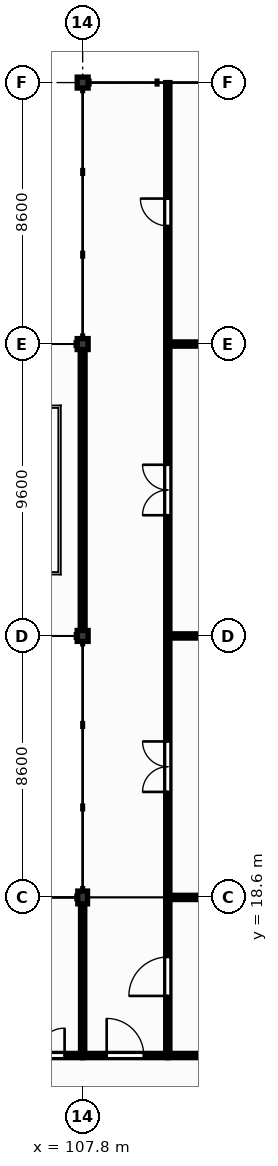
"""IFC4 building model, lengths in metres.
Left out: names, types, materials, properties, quantities, classifications, styles, units other than length and angle.
Written with IfcOpenShell. Run it as: python <this file> out.ifc"""

import sys

from ifc_helpers import new_model, si_unit, direction, frame, frame_2d, origin, origin_2d, place, context, subcontext, project, spatial, rectangle, extrude, element, fill, save


model = new_model("IFC4")
c1 = context("Model", 3, precision=1e-05, world=origin(), true_north=direction((0.0, 1.0)))
c2 = subcontext(c1, "Body", "Model", "MODEL_VIEW")
j1 = project(units=[si_unit("LENGTHUNIT", "METRE"), si_unit("PLANEANGLEUNIT", "RADIAN")], contexts=[c1])
p1 = place(None, origin())
s1 = spatial("IfcSite", under=j1, at=p1, CompositionType="ELEMENT")
p2 = place(p1, origin())
s2 = spatial("IfcBuilding", under=s1, at=p2, CompositionType="ELEMENT")
p3 = place(p2, frame((0.0, 0.0, 4.5)))
s3 = spatial("IfcBuildingStorey", under=s2, at=p3, CompositionType="ELEMENT", Elevation=4.5)
p4 = place(p3, frame((107.8, 18.6, 0.0), z_axis=(0.0, 0.0, 1.0), x_axis=(1.0, 0.0, 0.0)))
e1 = element("IfcColumn", 1, at=p4, inside=s3, PredefinedType="COLUMN", context=c2, shape_type="SweptSolid", body=[
    extrude(rectangle(XDim=0.32, YDim=0.42, at=origin_2d()), origin(), (0.0, 0.0, 1.0), 4.26),
])
for number, where, z_axis, x_axis in (
    (2, (107.8, 27.2, 0.0), (0.0, 0.0, 1.0), (1.0, 0.0, 0.0)),
    (3, (107.8, 36.8, 0.0), (0.0, 0.0, 1.0), (1.0, 0.0, 0.0)),
    (4, (107.8, 45.4, 0.0), (0.0, 0.0, 1.0), (1.0, 0.0, 0.0)),
):
    element("IfcColumn", number, at=place(p3, frame(where, z_axis=z_axis, x_axis=x_axis)), inside=s3, PredefinedType="COLUMN", context=c2, shape_type="SweptSolid", body=[
        extrude(rectangle(XDim=0.36, YDim=0.36, at=origin_2d()), origin(), (0.0, 0.0, 1.0), 4.3),
    ])
p5 = place(p3, frame((104.812, 13.4, 0.0), z_axis=(0.0, 0.0, 1.0), x_axis=(1.0, 0.0, 0.0)))
e5 = element("IfcWall", 5, at=p5, inside=s3, PredefinedType="PARTITIONING", context=c2, shape_type="SweptSolid", body=[
    extrude(rectangle(XDim=2.988, YDim=0.14, at=frame_2d((1.494, 0.0))), origin(), (0.0, 0.0, 1.0), 4.18),
])
p6 = place(p5, frame((0.594, 0.0, 0.0)))
e6 = element("IfcOpeningElement", 6, at=p6, cuts=e5, PredefinedType="OPENING", context=c2, shape_type="SweptSolid", body=[
    extrude(rectangle(XDim=1.8, YDim=2.3, at=frame_2d((0.9, 1.15))), frame((0.0, 0.08, 0.0), z_axis=(0.0, -1.0, 0.0), x_axis=(1.0, 0.0, 0.0)), (0.0, 0.0, 1.0), 0.16),
])
p7 = place(p3, frame((107.8, 13.47, 0.0), z_axis=(0.0, 0.0, 1.0), x_axis=(0.0, 1.0, 0.0)))
e7 = element("IfcWall", 7, at=p7, inside=s3, PredefinedType="PARTITIONING", context=c2, shape_type="SweptSolid", body=[
    extrude(rectangle(XDim=4.92, YDim=0.14, at=frame_2d((2.46, 0.0))), origin(), (0.0, 0.0, 1.0), 3.74),
])
p8 = place(p3, frame((107.8, 13.4, 0.0), z_axis=(0.0, 0.0, 1.0), x_axis=(1.0, 0.0, 0.0)))
e8 = element("IfcWall", 8, at=p8, inside=s3, PredefinedType="PARTITIONING", context=c2, shape_type="SweptSolid", body=[
    extrude(rectangle(XDim=2.8, YDim=0.14, at=frame_2d((1.4, 0.0))), origin(), (0.0, 0.0, 1.0), 4.18),
])
p9 = place(p8, frame((0.79, 0.0, 0.0)))
e9 = element("IfcOpeningElement", 9, at=p9, cuts=e8, PredefinedType="OPENING", context=c2, shape_type="SweptSolid", body=[
    extrude(rectangle(XDim=1.22, YDim=2.1, at=frame_2d((0.61, 1.05))), frame((0.0, 0.08, 0.0), z_axis=(0.0, -1.0, 0.0), x_axis=(1.0, 0.0, 0.0)), (0.0, 0.0, 1.0), 0.16),
])
p10 = place(p3, frame((110.6, 13.47, 0.0), z_axis=(0.0, 0.0, 1.0), x_axis=(0.0, 1.0, 0.0)))
e10 = element("IfcWall", 10, at=p10, inside=s3, PredefinedType="PARTITIONING", context=c2, shape_type="SweptSolid", body=[
    extrude(rectangle(XDim=5.06, YDim=0.14, at=frame_2d((2.53, 0.0))), origin(), (0.0, 0.0, 1.0), 4.18),
])
p11 = place(p10, frame((1.89, 0.0, 0.0)))
e11 = element("IfcOpeningElement", 11, at=p11, cuts=e10, PredefinedType="OPENING", context=c2, shape_type="SweptSolid", body=[
    extrude(rectangle(XDim=1.28, YDim=2.2, at=frame_2d((0.64, 1.1))), frame((0.0, 0.08, 0.0), z_axis=(0.0, -1.0, 0.0), x_axis=(1.0, 0.0, 0.0)), (0.0, 0.0, 1.0), 0.16),
])
p12 = place(p3, frame((110.6, 13.4, 0.0), z_axis=(0.0, 0.0, 1.0), x_axis=(1.0, 0.0, 0.0)))
e12 = element("IfcWall", 12, at=p12, inside=s3, PredefinedType="PARTITIONING", context=c2, shape_type="SweptSolid", body=[
    extrude(rectangle(XDim=4.4, YDim=0.14, at=frame_2d((2.2, 0.0))), origin(), (0.0, 0.0, 1.0), 4.18),
])
p13 = place(p3, frame((110.6, 18.67, 0.0), z_axis=(0.0, 0.0, 1.0), x_axis=(0.0, 1.0, 0.0)))
e13 = element("IfcWall", 13, at=p13, inside=s3, PredefinedType="PARTITIONING", context=c2, shape_type="SweptSolid", body=[
    extrude(rectangle(XDim=8.46, YDim=0.14, at=frame_2d((4.23, 0.0))), origin(), (0.0, 0.0, 1.0), 4.18),
])
p14 = place(p13, frame((3.4, 0.0, 0.0)))
e14 = element("IfcOpeningElement", 14, at=p14, cuts=e13, PredefinedType="OPENING", context=c2, shape_type="SweptSolid", body=[
    extrude(rectangle(XDim=1.66, YDim=2.3, at=frame_2d((0.83, 1.15))), frame((0.0, 0.08, 0.0), z_axis=(0.0, -1.0, 0.0), x_axis=(1.0, 0.0, 0.0)), (0.0, 0.0, 1.0), 0.16),
])
p15 = place(p3, frame((110.6, 18.6, 0.0), z_axis=(0.0, 0.0, 1.0), x_axis=(1.0, 0.0, 0.0)))
e15 = element("IfcWall", 15, at=p15, inside=s3, PredefinedType="PARTITIONING", context=c2, shape_type="SweptSolid", body=[
    extrude(rectangle(XDim=4.15, YDim=0.14, at=frame_2d((2.075, 0.0))), origin(), (0.0, 0.0, 1.0), 3.76),
])
p16 = place(p3, frame((110.6, 27.27, 0.0), z_axis=(0.0, 0.0, 1.0), x_axis=(0.0, 1.0, 0.0)))
e16 = element("IfcWall", 16, at=p16, inside=s3, PredefinedType="PARTITIONING", context=c2, shape_type="SweptSolid", body=[
    extrude(rectangle(XDim=9.46, YDim=0.14, at=frame_2d((4.73, 0.0))), origin(), (0.0, 0.0, 1.0), 4.18),
])
p17 = place(p16, frame((3.9, 0.0, 0.0)))
e17 = element("IfcOpeningElement", 17, at=p17, cuts=e16, PredefinedType="OPENING", context=c2, shape_type="SweptSolid", body=[
    extrude(rectangle(XDim=1.66, YDim=2.3, at=frame_2d((0.83, 1.15))), frame((0.0, 0.08, 0.0), z_axis=(0.0, -1.0, 0.0), x_axis=(1.0, 0.0, 0.0)), (0.0, 0.0, 1.0), 0.16),
])
p18 = place(p3, frame((110.6, 27.2, 0.0), z_axis=(0.0, 0.0, 1.0), x_axis=(1.0, 0.0, 0.0)))
e18 = element("IfcWall", 18, at=p18, inside=s3, PredefinedType="PARTITIONING", context=c2, shape_type="SweptSolid", body=[
    extrude(rectangle(XDim=4.15, YDim=0.14, at=frame_2d((2.075, 0.0))), origin(), (0.0, 0.0, 1.0), 3.87),
])
p19 = place(p3, frame((110.6, 36.87, 0.0), z_axis=(0.0, 0.0, 1.0), x_axis=(0.0, 1.0, 0.0)))
e19 = element("IfcWall", 19, at=p19, inside=s3, PredefinedType="PARTITIONING", context=c2, shape_type="SweptSolid", body=[
    extrude(rectangle(XDim=8.53, YDim=0.14, at=frame_2d((4.265, 0.0))), origin(), (0.0, 0.0, 1.0), 4.18),
])
p20 = place(p19, frame((3.815, 0.0, 0.0)))
e20 = element("IfcOpeningElement", 20, at=p20, cuts=e19, PredefinedType="OPENING", context=c2, shape_type="SweptSolid", body=[
    extrude(rectangle(XDim=0.9, YDim=2.1, at=frame_2d((0.45, 1.05))), frame((0.0, 0.08, 0.0), z_axis=(0.0, -1.0, 0.0), x_axis=(1.0, 0.0, 0.0)), (0.0, 0.0, 1.0), 0.16),
])
p21 = place(p3, frame((110.6, 36.8, 0.0), z_axis=(0.0, 0.0, 1.0), x_axis=(1.0, 0.0, 0.0)))
e21 = element("IfcWall", 21, at=p21, inside=s3, PredefinedType="PARTITIONING", context=c2, shape_type="SweptSolid", body=[
    extrude(rectangle(XDim=4.15, YDim=0.14, at=frame_2d((2.075, 0.0))), origin(), (0.0, 0.0, 1.0), 3.87),
])
p22 = place(p3, frame((107.8, 27.38, 0.0), z_axis=(0.0, 0.0, 1.0), x_axis=(0.0, 1.0, 0.0)))
e22 = element("IfcWall", 22, at=p22, inside=s3, PredefinedType="PARTITIONING", context=c2, shape_type="SweptSolid", body=[
    extrude(rectangle(XDim=9.24, YDim=0.16, at=frame_2d((4.62, 0.0))), origin(), (0.0, 0.0, 1.0), 4.18),
])
p23 = place(p9, origin())
e23 = element("IfcDoor", 23, at=p23, inside=s3, OperationType="SINGLE_SWING_LEFT", PredefinedType="DOOR", context=c2, shape_type="SweptSolid", body=[
    extrude(rectangle(XDim=1.22, YDim=2.1, at=frame_2d((0.61, 1.05))), frame((0.0, 0.025, 0.0), z_axis=(0.0, -1.0, 0.0), x_axis=(1.0, 0.0, 0.0)), (0.0, 0.0, 1.0), 0.05),
])
fill(e9, e23)
p24 = place(p17, origin())
e24 = element("IfcDoor", 24, at=p24, inside=s3, OperationType="DOUBLE_DOOR_SINGLE_SWING", PredefinedType="DOOR", context=c2, shape_type="SweptSolid", body=[
    extrude(rectangle(XDim=1.66, YDim=2.3, at=frame_2d((0.83, 1.15))), frame((0.0, 0.025, 0.0), z_axis=(0.0, -1.0, 0.0), x_axis=(1.0, 0.0, 0.0)), (0.0, 0.0, 1.0), 0.05),
])
fill(e17, e24)
p25 = place(p14, origin())
e25 = element("IfcDoor", 25, at=p25, inside=s3, OperationType="DOUBLE_DOOR_SINGLE_SWING", PredefinedType="DOOR", context=c2, shape_type="SweptSolid", body=[
    extrude(rectangle(XDim=1.66, YDim=2.3, at=frame_2d((0.83, 1.15))), frame((0.0, 0.025, 0.0), z_axis=(0.0, -1.0, 0.0), x_axis=(1.0, 0.0, 0.0)), (0.0, 0.0, 1.0), 0.05),
])
fill(e14, e25)
p26 = place(p20, origin())
e26 = element("IfcDoor", 26, at=p26, inside=s3, OperationType="SINGLE_SWING_RIGHT", PredefinedType="DOOR", context=c2, shape_type="SweptSolid", body=[
    extrude(rectangle(XDim=0.9, YDim=2.1, at=frame_2d((0.45, 1.05))), frame((0.0, 0.025, 0.0), z_axis=(0.0, -1.0, 0.0), x_axis=(1.0, 0.0, 0.0)), (0.0, 0.0, 1.0), 0.05),
])
fill(e20, e26)
p27 = place(p6, origin())
e27 = element("IfcDoor", 27, at=p27, inside=s3, OperationType="DOUBLE_DOOR_SINGLE_SWING", PredefinedType="DOOR", context=c2, shape_type="SweptSolid", body=[
    extrude(rectangle(XDim=1.8, YDim=2.3, at=frame_2d((0.9, 1.15))), frame((0.0, 0.025, 0.0), z_axis=(0.0, -1.0, 0.0), x_axis=(1.0, 0.0, 0.0)), (0.0, 0.0, 1.0), 0.05),
])
fill(e6, e27)
p28 = place(p11, origin())
e28 = element("IfcDoor", 28, at=p28, inside=s3, OperationType="SINGLE_SWING_LEFT", PredefinedType="DOOR", context=c2, shape_type="SweptSolid", body=[
    extrude(rectangle(XDim=1.28, YDim=2.2, at=frame_2d((0.64, 1.1))), frame((0.0, 0.025, 0.0), z_axis=(0.0, -1.0, 0.0), x_axis=(1.0, 0.0, 0.0)), (0.0, 0.0, 1.0), 0.05),
])
fill(e11, e28)
save(model, sys.argv[1])
